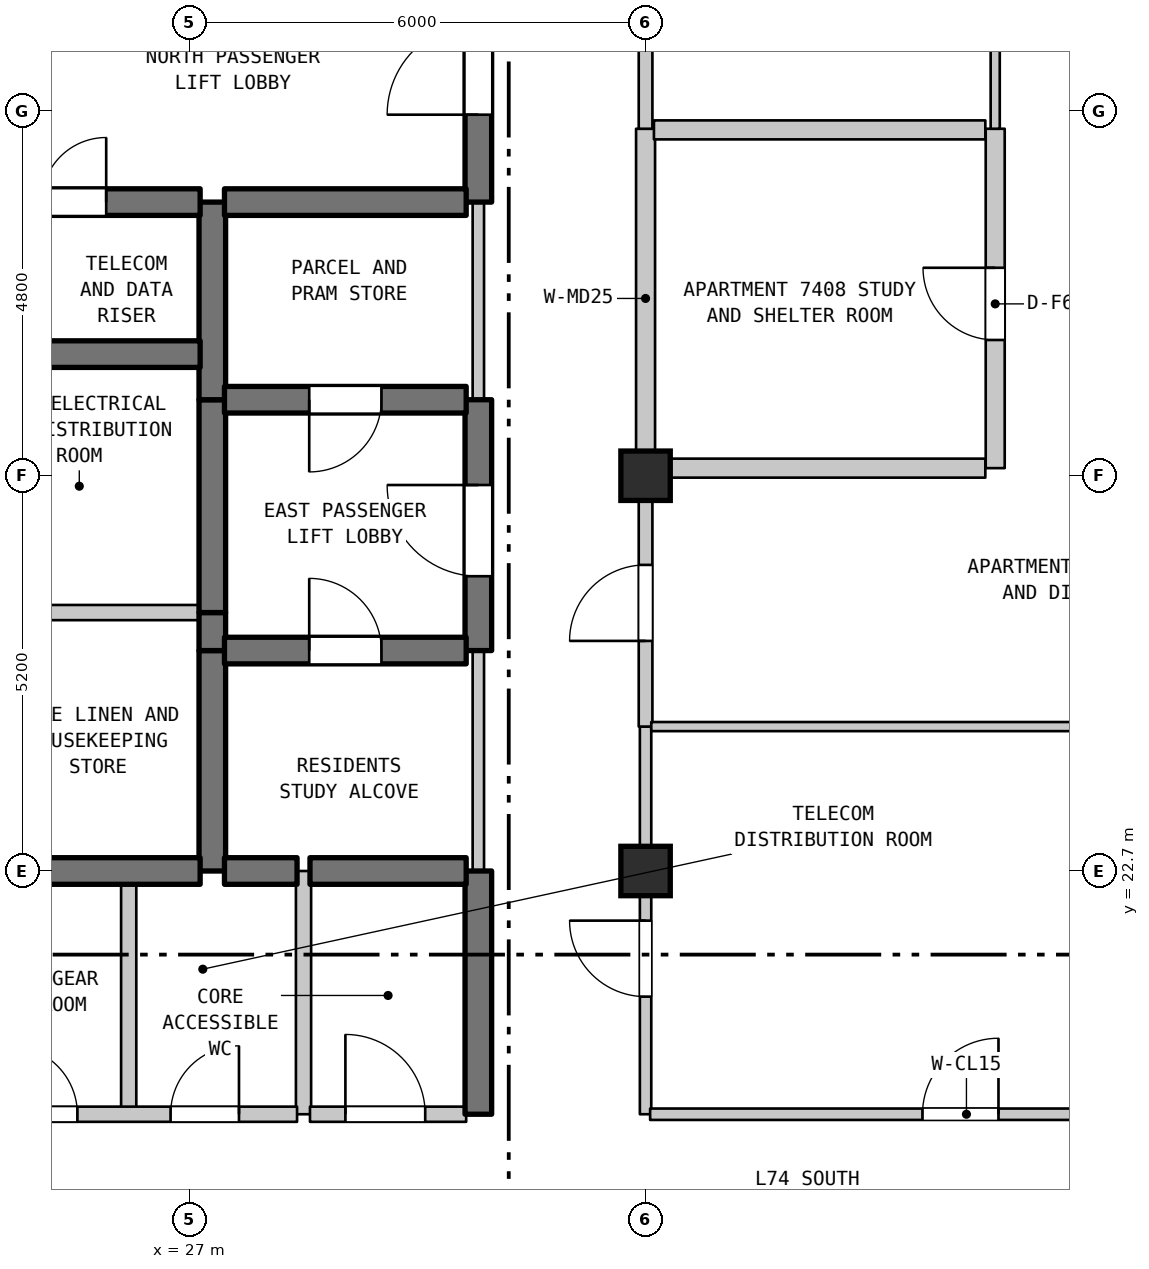
"""IFC4 building model, lengths in metres.
Left out: names, types, materials, properties, quantities, classifications, styles, units other than length and angle.
Written with IfcOpenShell. Run it as: python <this file> out.ifc"""

import sys

from ifc_helpers import new_model, si_unit, direction, frame, frame_2d, origin, origin_2d, place, context, subcontext, project, spatial, rectangle, extrude, element, fill, save


model = new_model("IFC4")
c1 = context("Model", 3, precision=1e-05, world=origin(), true_north=direction((0.0, 1.0)))
c2 = subcontext(c1, "Body", "Model", "MODEL_VIEW")
j1 = project(units=[si_unit("LENGTHUNIT", "METRE"), si_unit("PLANEANGLEUNIT", "RADIAN")], contexts=[c1])
p1 = place(None, origin())
s1 = spatial("IfcSite", under=j1, at=p1, CompositionType="ELEMENT")
p2 = place(p1, origin())
s2 = spatial("IfcBuilding", under=s1, at=p2, CompositionType="ELEMENT")
p3 = place(p2, frame((0.0, 0.0, 295.4)))
s3 = spatial("IfcBuildingStorey", under=s2, at=p3, CompositionType="ELEMENT", Elevation=295.4)
for number, where, z_axis, x_axis in (
    (1, (33.0, 22.7, 0.0), (0.0, 0.0, 1.0), (1.0, 0.0, 0.0)),
    (2, (33.0, 27.9, 0.0), (0.0, 0.0, 1.0), (1.0, 0.0, 0.0)),
):
    element("IfcColumn", number, at=place(p3, frame(where, z_axis=z_axis, x_axis=x_axis)), inside=s3, PredefinedType="COLUMN", context=c2, shape_type="SweptSolid", body=[
        extrude(rectangle(XDim=0.65, YDim=0.65, at=origin_2d()), origin(), (0.0, 0.0, 1.0), 3.7),
    ])
p4 = place(p3, frame((26.2, 19.5, 0.0), z_axis=(0.0, 0.0, 1.0), x_axis=(0.0, 1.0, 0.0)))
e3 = element("IfcWall", 3, at=p4, inside=s3, PredefinedType="STANDARD", context=c2, shape_type="SweptSolid", body=[
    extrude(rectangle(XDim=3.2, YDim=0.2, at=frame_2d((1.6, 0.0))), origin(), (0.0, 0.0, 1.0), 3.38),
])
p5 = place(p3, frame((27.3, 22.7, 0.0), z_axis=(0.0, 0.0, 1.0), x_axis=(0.0, 1.0, 0.0)))
e4 = element("IfcWall", 4, at=p5, inside=s3, PredefinedType="SHEAR", context=c2, shape_type="SweptSolid", body=[
    extrude(rectangle(XDim=2.9, YDim=0.35, at=frame_2d((1.45, 0.0))), origin(), (0.0, 0.0, 1.0), 3.38),
])
p6 = place(p3, frame((27.3, 25.6, 0.0), z_axis=(0.0, 0.0, 1.0), x_axis=(0.0, 1.0, 0.0)))
e5 = element("IfcWall", 5, at=p6, inside=s3, PredefinedType="SHEAR", context=c2, shape_type="SweptSolid", body=[
    extrude(rectangle(XDim=0.5, YDim=0.35, at=frame_2d((0.25, 0.0))), origin(), (0.0, 0.0, 1.0), 3.38),
])
p7 = place(p3, frame((27.3, 26.1, 0.0), z_axis=(0.0, 0.0, 1.0), x_axis=(0.0, 1.0, 0.0)))
e6 = element("IfcWall", 6, at=p7, inside=s3, PredefinedType="SHEAR", context=c2, shape_type="SweptSolid", body=[
    extrude(rectangle(XDim=2.8, YDim=0.35, at=frame_2d((1.4, 0.0))), origin(), (0.0, 0.0, 1.0), 3.38),
])
p8 = place(p3, frame((27.3, 28.9, 0.0), z_axis=(0.0, 0.0, 1.0), x_axis=(0.0, 1.0, 0.0)))
e7 = element("IfcWall", 7, at=p8, inside=s3, PredefinedType="SHEAR", context=c2, shape_type="SweptSolid", body=[
    extrude(rectangle(XDim=2.6, YDim=0.35, at=frame_2d((1.3, 0.0))), origin(), (0.0, 0.0, 1.0), 3.38),
])
p9 = place(p3, frame((28.5, 19.5, 0.0), z_axis=(0.0, 0.0, 1.0), x_axis=(0.0, 1.0, 0.0)))
e8 = element("IfcWall", 8, at=p9, inside=s3, PredefinedType="STANDARD", context=c2, shape_type="SweptSolid", body=[
    extrude(rectangle(XDim=3.2, YDim=0.2, at=frame_2d((1.6, 0.0))), origin(), (0.0, 0.0, 1.0), 3.38),
])
p10 = place(p3, frame((30.8, 19.5, 0.0), z_axis=(0.0, 0.0, 1.0), x_axis=(0.0, 1.0, 0.0)))
e9 = element("IfcWall", 9, at=p10, inside=s3, PredefinedType="SHEAR", context=c2, shape_type="SweptSolid", body=[
    extrude(rectangle(XDim=3.2, YDim=0.35, at=frame_2d((1.6, 0.0))), origin(), (0.0, 0.0, 1.0), 3.38),
])
p11 = place(p3, frame((30.8, 22.7, 0.0), z_axis=(0.0, 0.0, 1.0), x_axis=(0.0, 1.0, 0.0)))
e10 = element("IfcWall", 10, at=p11, inside=s3, PredefinedType="STANDARD", context=c2, shape_type="SweptSolid", body=[
    extrude(rectangle(XDim=2.9, YDim=0.15, at=frame_2d((1.45, 0.0))), origin(), (0.0, 0.0, 1.0), 3.38),
])
p12 = place(p3, frame((30.8, 25.6, 0.0), z_axis=(0.0, 0.0, 1.0), x_axis=(0.0, 1.0, 0.0)))
e11 = element("IfcWall", 11, at=p12, inside=s3, PredefinedType="SHEAR", context=c2, shape_type="SweptSolid", body=[
    extrude(rectangle(XDim=3.3, YDim=0.35, at=frame_2d((1.65, 0.0))), origin(), (0.0, 0.0, 1.0), 3.38),
])
p13 = place(p12, frame((0.978, 0.0, 0.0)))
e12 = element("IfcOpeningElement", 12, at=p13, cuts=e11, PredefinedType="OPENING", context=c2, shape_type="SweptSolid", body=[
    extrude(rectangle(XDim=1.2, YDim=2.2, at=frame_2d((0.6, 1.1))), frame((0.0, 0.185, 0.0), z_axis=(0.0, -1.0, 0.0), x_axis=(1.0, 0.0, 0.0)), (0.0, 0.0, 1.0), 0.37),
])
p14 = place(p3, frame((30.8, 28.9, 0.0), z_axis=(0.0, 0.0, 1.0), x_axis=(0.0, 1.0, 0.0)))
e13 = element("IfcWall", 13, at=p14, inside=s3, PredefinedType="STANDARD", context=c2, shape_type="SweptSolid", body=[
    extrude(rectangle(XDim=2.6, YDim=0.15, at=frame_2d((1.3, 0.0))), origin(), (0.0, 0.0, 1.0), 3.38),
])
p15 = place(p3, frame((30.8, 31.5, 0.0), z_axis=(0.0, 0.0, 1.0), x_axis=(0.0, 1.0, 0.0)))
e14 = element("IfcWall", 14, at=p15, inside=s3, PredefinedType="SHEAR", context=c2, shape_type="SweptSolid", body=[
    extrude(rectangle(XDim=3.5, YDim=0.35, at=frame_2d((1.75, 0.0))), origin(), (0.0, 0.0, 1.0), 3.38),
])
p16 = place(p15, frame((1.15, 0.0, 0.0)))
e15 = element("IfcOpeningElement", 15, at=p16, cuts=e14, PredefinedType="OPENING", context=c2, shape_type="SweptSolid", body=[
    extrude(rectangle(XDim=1.2, YDim=2.2, at=frame_2d((0.6, 1.1))), frame((0.0, 0.185, 0.0), z_axis=(0.0, -1.0, 0.0), x_axis=(1.0, 0.0, 0.0)), (0.0, 0.0, 1.0), 0.37),
])
p17 = place(p3, frame((33.0, 19.5, 0.0), z_axis=(0.0, 0.0, 1.0), x_axis=(0.0, 1.0, 0.0)))
e16 = element("IfcWall", 16, at=p17, inside=s3, PredefinedType="STANDARD", context=c2, shape_type="SweptSolid", body=[
    extrude(rectangle(XDim=5.1, YDim=0.15, at=frame_2d((2.55, 0.0))), origin(), (0.0, 0.0, 1.0), 3.09),
])
p18 = place(p17, frame((1.547, 0.0, 0.0)))
e17 = element("IfcOpeningElement", 17, at=p18, cuts=e16, PredefinedType="OPENING", context=c2, shape_type="SweptSolid", body=[
    extrude(rectangle(XDim=1.0, YDim=2.15, at=frame_2d((0.5, 1.075))), frame((0.0, 0.085, 0.0), z_axis=(0.0, -1.0, 0.0), x_axis=(1.0, 0.0, 0.0)), (0.0, 0.0, 1.0), 0.17),
])
p19 = place(p3, frame((33.0, 24.6, 0.0), z_axis=(0.0, 0.0, 1.0), x_axis=(0.0, 1.0, 0.0)))
e18 = element("IfcWall", 18, at=p19, inside=s3, PredefinedType="STANDARD", context=c2, shape_type="SweptSolid", body=[
    extrude(rectangle(XDim=3.4, YDim=0.18, at=frame_2d((1.7, 0.0))), origin(), (0.0, 0.0, 1.0), 3.09),
])
p20 = place(p19, frame((1.127, 0.0, 0.0)))
e19 = element("IfcOpeningElement", 19, at=p20, cuts=e18, PredefinedType="OPENING", context=c2, shape_type="SweptSolid", body=[
    extrude(rectangle(XDim=1.0, YDim=2.15, at=frame_2d((0.5, 1.075))), frame((0.0, 0.1, 0.0), z_axis=(0.0, -1.0, 0.0), x_axis=(1.0, 0.0, 0.0)), (0.0, 0.0, 1.0), 0.2),
])
p21 = place(p3, frame((33.0, 28.0, 0.0), z_axis=(0.0, 0.0, 1.0), x_axis=(0.0, 1.0, 0.0)))
e20 = element("IfcWall", 20, at=p21, inside=s3, PredefinedType="STANDARD", context=c2, shape_type="SweptSolid", body=[
    extrude(rectangle(XDim=4.465, YDim=0.25, at=frame_2d((2.232, 0.0))), origin(), (0.0, 0.0, 1.0), 2.88),
])
p22 = place(p3, frame((33.0, 32.465, 0.0), z_axis=(0.0, 0.0, 1.0), x_axis=(0.0, 1.0, 0.0)))
e21 = element("IfcWall", 21, at=p22, inside=s3, PredefinedType="STANDARD", context=c2, shape_type="SweptSolid", body=[
    extrude(rectangle(XDim=3.29, YDim=0.18, at=frame_2d((1.645, 0.0))), origin(), (0.0, 0.0, 1.0), 2.88),
])
p23 = place(p3, frame((37.6, 28.0, 0.0), z_axis=(0.0, 0.0, 1.0), x_axis=(0.0, 1.0, 0.0)))
e22 = element("IfcWall", 22, at=p23, inside=s3, PredefinedType="STANDARD", context=c2, shape_type="SweptSolid", body=[
    extrude(rectangle(XDim=4.465, YDim=0.25, at=frame_2d((2.232, 0.0))), origin(), (0.0, 0.0, 1.0), 3.38),
])
p24 = place(p23, frame((1.686, 0.0, 0.0)))
e23 = element("IfcOpeningElement", 23, at=p24, cuts=e22, PredefinedType="OPENING", context=c2, shape_type="SweptSolid", body=[
    extrude(rectangle(XDim=0.95, YDim=2.15, at=frame_2d((0.475, 1.075))), frame((0.0, 0.135, 0.0), z_axis=(0.0, -1.0, 0.0), x_axis=(1.0, 0.0, 0.0)), (0.0, 0.0, 1.0), 0.27),
])
p25 = place(p3, frame((37.6, 32.465, 0.0), z_axis=(0.0, 0.0, 1.0), x_axis=(0.0, 1.0, 0.0)))
e24 = element("IfcWall", 24, at=p25, inside=s3, PredefinedType="PARTITIONING", context=c2, shape_type="SweptSolid", body=[
    extrude(rectangle(XDim=3.29, YDim=0.12, at=frame_2d((1.645, 0.0))), origin(), (0.0, 0.0, 1.0), 3.38),
])
p26 = place(p25, frame((1.123, 0.0, 0.0)))
e25 = element("IfcOpeningElement", 25, at=p26, cuts=e24, PredefinedType="OPENING", context=c2, shape_type="SweptSolid", body=[
    extrude(rectangle(XDim=0.9, YDim=2.1, at=frame_2d((0.45, 1.05))), frame((0.0, 0.07, 0.0), z_axis=(0.0, -1.0, 0.0), x_axis=(1.0, 0.0, 0.0)), (0.0, 0.0, 1.0), 0.14),
])
p27 = place(p3, frame((23.96, 19.5, 0.0), z_axis=(0.0, 0.0, 1.0), x_axis=(1.0, 0.0, 0.0)))
e26 = element("IfcWall", 26, at=p27, inside=s3, PredefinedType="STANDARD", context=c2, shape_type="SweptSolid", body=[
    extrude(rectangle(XDim=4.455, YDim=0.2, at=frame_2d((2.228, 0.0))), origin(), (0.0, 0.0, 1.0), 3.38),
])
p28 = place(p27, frame((0.665, 0.0, 0.0)))
e27 = element("IfcOpeningElement", 27, at=p28, cuts=e26, PredefinedType="OPENING", context=c2, shape_type="SweptSolid", body=[
    extrude(rectangle(XDim=0.9, YDim=2.15, at=frame_2d((0.45, 1.075))), frame((0.0, 0.11, 0.0), z_axis=(0.0, -1.0, 0.0), x_axis=(1.0, 0.0, 0.0)), (0.0, 0.0, 1.0), 0.22),
])
p29 = place(p27, frame((2.791, 0.0, 0.0)))
e28 = element("IfcOpeningElement", 28, at=p29, cuts=e26, PredefinedType="OPENING", context=c2, shape_type="SweptSolid", body=[
    extrude(rectangle(XDim=0.9, YDim=2.15, at=frame_2d((0.45, 1.075))), frame((0.0, 0.11, 0.0), z_axis=(0.0, -1.0, 0.0), x_axis=(1.0, 0.0, 0.0)), (0.0, 0.0, 1.0), 0.22),
])
p30 = place(p3, frame((28.585, 19.5, 0.0), z_axis=(0.0, 0.0, 1.0), x_axis=(1.0, 0.0, 0.0)))
e29 = element("IfcWall", 29, at=p30, inside=s3, PredefinedType="STANDARD", context=c2, shape_type="SweptSolid", body=[
    extrude(rectangle(XDim=2.055, YDim=0.2, at=frame_2d((1.027, 0.0))), origin(), (0.0, 0.0, 1.0), 3.38),
])
p31 = place(p30, frame((0.466, 0.0, 0.0)))
e30 = element("IfcOpeningElement", 30, at=p31, cuts=e29, PredefinedType="OPENING", context=c2, shape_type="SweptSolid", body=[
    extrude(rectangle(XDim=1.05, YDim=2.15, at=frame_2d((0.525, 1.075))), frame((0.0, 0.11, 0.0), z_axis=(0.0, -1.0, 0.0), x_axis=(1.0, 0.0, 0.0)), (0.0, 0.0, 1.0), 0.22),
])
p32 = place(p3, frame((33.06, 19.5, 0.0), z_axis=(0.0, 0.0, 1.0), x_axis=(1.0, 0.0, 0.0)))
e31 = element("IfcWall", 31, at=p32, inside=s3, PredefinedType="STANDARD", context=c2, shape_type="SweptSolid", body=[
    extrude(rectangle(XDim=8.323, YDim=0.15, at=frame_2d((4.162, 0.0))), origin(), (0.0, 0.0, 1.0), 3.38),
])
p33 = place(p32, frame((3.583, 0.0, 0.0)))
e32 = element("IfcOpeningElement", 32, at=p33, cuts=e31, PredefinedType="OPENING", context=c2, shape_type="SweptSolid", body=[
    extrude(rectangle(XDim=1.0, YDim=2.15, at=frame_2d((0.5, 1.075))), frame((0.0, 0.085, 0.0), z_axis=(0.0, -1.0, 0.0), x_axis=(1.0, 0.0, 0.0)), (0.0, 0.0, 1.0), 0.17),
])
p34 = place(p3, frame((23.96, 22.7, 0.0), z_axis=(0.0, 0.0, 1.0), x_axis=(1.0, 0.0, 0.0)))
e33 = element("IfcWall", 33, at=p34, inside=s3, PredefinedType="SHEAR", context=c2, shape_type="SweptSolid", body=[
    extrude(rectangle(XDim=3.18, YDim=0.35, at=frame_2d((1.59, 0.0))), origin(), (0.0, 0.0, 1.0), 3.38),
])
p35 = place(p3, frame((27.46, 22.7, 0.0), z_axis=(0.0, 0.0, 1.0), x_axis=(1.0, 0.0, 0.0)))
e34 = element("IfcWall", 34, at=p35, inside=s3, PredefinedType="SHEAR", context=c2, shape_type="SweptSolid", body=[
    extrude(rectangle(XDim=0.955, YDim=0.35, at=frame_2d((0.478, 0.0))), origin(), (0.0, 0.0, 1.0), 3.38),
])
p36 = place(p3, frame((28.585, 22.7, 0.0), z_axis=(0.0, 0.0, 1.0), x_axis=(1.0, 0.0, 0.0)))
e35 = element("IfcWall", 35, at=p36, inside=s3, PredefinedType="SHEAR", context=c2, shape_type="SweptSolid", body=[
    extrude(rectangle(XDim=2.055, YDim=0.35, at=frame_2d((1.027, 0.0))), origin(), (0.0, 0.0, 1.0), 3.38),
])
p37 = place(p3, frame((33.075, 24.6, 0.0), z_axis=(0.0, 0.0, 1.0), x_axis=(1.0, 0.0, 0.0)))
e36 = element("IfcWall", 36, at=p37, inside=s3, PredefinedType="PARTITIONING", context=c2, shape_type="SweptSolid", body=[
    extrude(rectangle(XDim=11.448, YDim=0.12, at=frame_2d((5.724, 0.0))), origin(), (0.0, 0.0, 1.0), 3.38),
])
p38 = place(p3, frame((27.46, 25.6, 0.0), z_axis=(0.0, 0.0, 1.0), x_axis=(1.0, 0.0, 0.0)))
e37 = element("IfcWall", 37, at=p38, inside=s3, PredefinedType="SHEAR", context=c2, shape_type="SweptSolid", body=[
    extrude(rectangle(XDim=3.18, YDim=0.35, at=frame_2d((1.59, 0.0))), origin(), (0.0, 0.0, 1.0), 3.38),
])
p39 = place(p38, frame((1.115, 0.0, 0.0)))
e38 = element("IfcOpeningElement", 38, at=p39, cuts=e37, PredefinedType="OPENING", context=c2, shape_type="SweptSolid", body=[
    extrude(rectangle(XDim=0.95, YDim=2.15, at=frame_2d((0.475, 1.075))), frame((0.0, 0.185, 0.0), z_axis=(0.0, -1.0, 0.0), x_axis=(1.0, 0.0, 0.0)), (0.0, 0.0, 1.0), 0.37),
])
p40 = place(p3, frame((23.96, 26.1, 0.0), z_axis=(0.0, 0.0, 1.0), x_axis=(1.0, 0.0, 0.0)))
e39 = element("IfcWall", 39, at=p40, inside=s3, PredefinedType="STANDARD", context=c2, shape_type="SweptSolid", body=[
    extrude(rectangle(XDim=3.18, YDim=0.2, at=frame_2d((1.59, 0.0))), origin(), (0.0, 0.0, 1.0), 3.38),
])
p41 = place(p3, frame((33.11, 28.0, 0.0), z_axis=(0.0, 0.0, 1.0), x_axis=(1.0, 0.0, 0.0)))
e40 = element("IfcWall", 40, at=p41, inside=s3, PredefinedType="STANDARD", context=c2, shape_type="SweptSolid", body=[
    extrude(rectangle(XDim=4.36, YDim=0.25, at=frame_2d((2.18, 0.0))), origin(), (0.0, 0.0, 1.0), 2.88),
])
p42 = place(p3, frame((27.46, 28.9, 0.0), z_axis=(0.0, 0.0, 1.0), x_axis=(1.0, 0.0, 0.0)))
e41 = element("IfcWall", 41, at=p42, inside=s3, PredefinedType="SHEAR", context=c2, shape_type="SweptSolid", body=[
    extrude(rectangle(XDim=3.18, YDim=0.35, at=frame_2d((1.59, 0.0))), origin(), (0.0, 0.0, 1.0), 3.38),
])
p43 = place(p42, frame((1.115, 0.0, 0.0)))
e42 = element("IfcOpeningElement", 42, at=p43, cuts=e41, PredefinedType="OPENING", context=c2, shape_type="SweptSolid", body=[
    extrude(rectangle(XDim=0.95, YDim=2.15, at=frame_2d((0.475, 1.075))), frame((0.0, 0.185, 0.0), z_axis=(0.0, -1.0, 0.0), x_axis=(1.0, 0.0, 0.0)), (0.0, 0.0, 1.0), 0.37),
])
p44 = place(p3, frame((23.96, 29.5, 0.0), z_axis=(0.0, 0.0, 1.0), x_axis=(1.0, 0.0, 0.0)))
e43 = element("IfcWall", 43, at=p44, inside=s3, PredefinedType="SHEAR", context=c2, shape_type="SweptSolid", body=[
    extrude(rectangle(XDim=3.18, YDim=0.35, at=frame_2d((1.59, 0.0))), origin(), (0.0, 0.0, 1.0), 3.38),
])
p45 = place(p3, frame((23.96, 31.5, 0.0), z_axis=(0.0, 0.0, 1.0), x_axis=(1.0, 0.0, 0.0)))
e44 = element("IfcWall", 44, at=p45, inside=s3, PredefinedType="SHEAR", context=c2, shape_type="SweptSolid", body=[
    extrude(rectangle(XDim=3.18, YDim=0.35, at=frame_2d((1.59, 0.0))), origin(), (0.0, 0.0, 1.0), 3.38),
])
p46 = place(p45, frame((1.094, 0.0, 0.0)))
e45 = element("IfcOpeningElement", 45, at=p46, cuts=e44, PredefinedType="OPENING", context=c2, shape_type="SweptSolid", body=[
    extrude(rectangle(XDim=0.85, YDim=2.1, at=frame_2d((0.425, 1.05))), frame((0.0, 0.185, 0.0), z_axis=(0.0, -1.0, 0.0), x_axis=(1.0, 0.0, 0.0)), (0.0, 0.0, 1.0), 0.37),
])
p47 = place(p3, frame((27.46, 31.5, 0.0), z_axis=(0.0, 0.0, 1.0), x_axis=(1.0, 0.0, 0.0)))
e46 = element("IfcWall", 46, at=p47, inside=s3, PredefinedType="SHEAR", context=c2, shape_type="SweptSolid", body=[
    extrude(rectangle(XDim=3.18, YDim=0.35, at=frame_2d((1.59, 0.0))), origin(), (0.0, 0.0, 1.0), 3.38),
])
p48 = place(p3, frame((33.11, 32.45, 0.0), z_axis=(0.0, 0.0, 1.0), x_axis=(1.0, 0.0, 0.0)))
e47 = element("IfcWall", 47, at=p48, inside=s3, PredefinedType="STANDARD", context=c2, shape_type="SweptSolid", body=[
    extrude(rectangle(XDim=4.36, YDim=0.25, at=frame_2d((2.18, 0.0))), origin(), (0.0, 0.0, 1.0), 3.38),
])
p49 = place(p13, origin())
e48 = element("IfcDoor", 48, at=p49, inside=s3, OperationType="SINGLE_SWING_RIGHT", PredefinedType="DOOR", context=c2, shape_type="SweptSolid", body=[
    extrude(rectangle(XDim=1.2, YDim=2.2, at=frame_2d((0.6, 1.1))), frame((0.0, 0.025, 0.0), z_axis=(0.0, -1.0, 0.0), x_axis=(1.0, 0.0, 0.0)), (0.0, 0.0, 1.0), 0.05),
])
fill(e12, e48)
p50 = place(p16, origin())
e49 = element("IfcDoor", 49, at=p50, inside=s3, OperationType="SINGLE_SWING_LEFT", PredefinedType="DOOR", context=c2, shape_type="SweptSolid", body=[
    extrude(rectangle(XDim=1.2, YDim=2.2, at=frame_2d((0.6, 1.1))), frame((0.0, 0.025, 0.0), z_axis=(0.0, -1.0, 0.0), x_axis=(1.0, 0.0, 0.0)), (0.0, 0.0, 1.0), 0.05),
])
fill(e15, e49)
p51 = place(p18, origin())
e50 = element("IfcDoor", 50, at=p51, inside=s3, OperationType="SINGLE_SWING_RIGHT", PredefinedType="DOOR", context=c2, shape_type="SweptSolid", body=[
    extrude(rectangle(XDim=1.0, YDim=2.15, at=frame_2d((0.5, 1.075))), frame((0.0, 0.025, 0.0), z_axis=(0.0, -1.0, 0.0), x_axis=(1.0, 0.0, 0.0)), (0.0, 0.0, 1.0), 0.05),
])
fill(e17, e50)
p52 = place(p20, origin())
e51 = element("IfcDoor", 51, at=p52, inside=s3, OperationType="SINGLE_SWING_LEFT", PredefinedType="DOOR", context=c2, shape_type="SweptSolid", body=[
    extrude(rectangle(XDim=1.0, YDim=2.15, at=frame_2d((0.5, 1.075))), frame((0.0, 0.025, 0.0), z_axis=(0.0, -1.0, 0.0), x_axis=(1.0, 0.0, 0.0)), (0.0, 0.0, 1.0), 0.05),
])
fill(e19, e51)
p53 = place(p24, origin())
e52 = element("IfcDoor", 52, at=p53, inside=s3, OperationType="SINGLE_SWING_RIGHT", PredefinedType="DOOR", context=c2, shape_type="SweptSolid", body=[
    extrude(rectangle(XDim=0.95, YDim=2.15, at=frame_2d((0.475, 1.075))), frame((0.0, 0.025, 0.0), z_axis=(0.0, -1.0, 0.0), x_axis=(1.0, 0.0, 0.0)), (0.0, 0.0, 1.0), 0.05),
])
fill(e23, e52)
p54 = place(p28, origin())
e53 = element("IfcDoor", 53, at=p54, inside=s3, OperationType="SINGLE_SWING_LEFT", PredefinedType="DOOR", context=c2, shape_type="SweptSolid", body=[
    extrude(rectangle(XDim=0.9, YDim=2.15, at=frame_2d((0.45, 1.075))), frame((0.0, 0.025, 0.0), z_axis=(0.0, -1.0, 0.0), x_axis=(1.0, 0.0, 0.0)), (0.0, 0.0, 1.0), 0.05),
])
fill(e27, e53)
p55 = place(p29, origin())
e54 = element("IfcDoor", 54, at=p55, inside=s3, OperationType="SINGLE_SWING_RIGHT", PredefinedType="DOOR", context=c2, shape_type="SweptSolid", body=[
    extrude(rectangle(XDim=0.9, YDim=2.15, at=frame_2d((0.45, 1.075))), frame((0.0, 0.025, 0.0), z_axis=(0.0, -1.0, 0.0), x_axis=(1.0, 0.0, 0.0)), (0.0, 0.0, 1.0), 0.05),
])
fill(e28, e54)
p56 = place(p31, origin())
e55 = element("IfcDoor", 55, at=p56, inside=s3, OperationType="SINGLE_SWING_LEFT", PredefinedType="DOOR", context=c2, shape_type="SweptSolid", body=[
    extrude(rectangle(XDim=1.05, YDim=2.15, at=frame_2d((0.525, 1.075))), frame((0.0, 0.025, 0.0), z_axis=(0.0, -1.0, 0.0), x_axis=(1.0, 0.0, 0.0)), (0.0, 0.0, 1.0), 0.05),
])
fill(e30, e55)
p57 = place(p33, origin())
e56 = element("IfcDoor", 56, at=p57, inside=s3, OperationType="SINGLE_SWING_RIGHT", PredefinedType="DOOR", context=c2, shape_type="SweptSolid", body=[
    extrude(rectangle(XDim=1.0, YDim=2.15, at=frame_2d((0.5, 1.075))), frame((0.0, 0.025, 0.0), z_axis=(0.0, -1.0, 0.0), x_axis=(1.0, 0.0, 0.0)), (0.0, 0.0, 1.0), 0.05),
])
fill(e32, e56)
p58 = place(p39, origin())
e57 = element("IfcDoor", 57, at=p58, inside=s3, OperationType="SINGLE_SWING_LEFT", PredefinedType="DOOR", context=c2, shape_type="SweptSolid", body=[
    extrude(rectangle(XDim=0.95, YDim=2.15, at=frame_2d((0.475, 1.075))), frame((0.0, 0.025, 0.0), z_axis=(0.0, -1.0, 0.0), x_axis=(1.0, 0.0, 0.0)), (0.0, 0.0, 1.0), 0.05),
])
fill(e38, e57)
p59 = place(p43, frame((0.95, 0.0, 0.0), z_axis=(0.0, 0.0, 1.0), x_axis=(-1.0, 0.0, 0.0)))
e58 = element("IfcDoor", 58, at=p59, inside=s3, OperationType="SINGLE_SWING_LEFT", PredefinedType="DOOR", context=c2, shape_type="SweptSolid", body=[
    extrude(rectangle(XDim=0.95, YDim=2.15, at=frame_2d((0.475, 1.075))), frame((0.0, 0.025, 0.0), z_axis=(0.0, -1.0, 0.0), x_axis=(1.0, 0.0, 0.0)), (0.0, 0.0, 1.0), 0.05),
])
fill(e42, e58)
p60 = place(p46, origin())
e59 = element("IfcDoor", 59, at=p60, inside=s3, OperationType="SINGLE_SWING_RIGHT", PredefinedType="DOOR", context=c2, shape_type="SweptSolid", body=[
    extrude(rectangle(XDim=0.85, YDim=2.1, at=frame_2d((0.425, 1.05))), frame((0.0, 0.025, 0.0), z_axis=(0.0, -1.0, 0.0), x_axis=(1.0, 0.0, 0.0)), (0.0, 0.0, 1.0), 0.05),
])
fill(e45, e59)
save(model, sys.argv[1])
